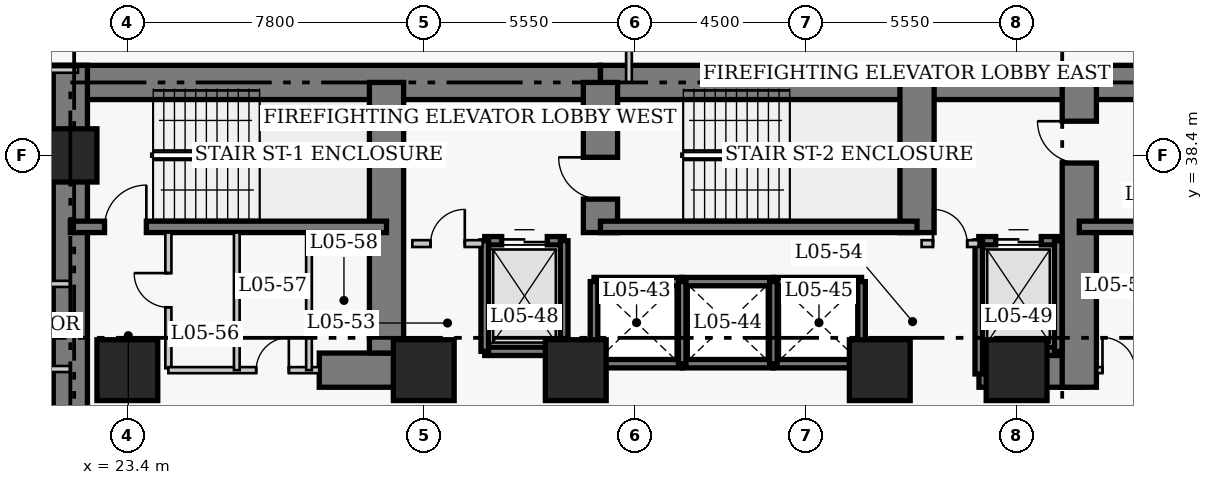
"""IFC4 building model, lengths in metres.
Left out: names, types, materials, properties, quantities, classifications, styles, units other than length and angle.
Written with IfcOpenShell. Run it as: python <this file> out.ifc"""

import sys

from ifc_helpers import new_model, si_unit, direction, frame, frame_2d, origin, origin_2d, place, context, subcontext, project, spatial, rectangle, extrude, element, fill, save


model = new_model("IFC4")
c1 = context("Model", 3, precision=1e-05, world=origin(), true_north=direction((0.0, 1.0)))
c2 = subcontext(c1, "Body", "Model", "MODEL_VIEW")
j1 = project(units=[si_unit("LENGTHUNIT", "METRE"), si_unit("PLANEANGLEUNIT", "RADIAN")], contexts=[c1])
p1 = place(None, origin())
s1 = spatial("IfcSite", under=j1, at=p1, CompositionType="ELEMENT")
p2 = place(p1, origin())
s2 = spatial("IfcBuilding", under=s1, at=p2, CompositionType="ELEMENT")
p3 = place(p2, frame((0.0, 0.0, 26.0)))
s3 = spatial("IfcBuildingStorey", under=s2, at=p3, CompositionType="ELEMENT", Elevation=26.0)
p4 = place(p3, frame((21.45, 40.32, 0.0), z_axis=(0.0, 0.0, 1.0), x_axis=(1.0, 0.0, 0.0)))
e1 = element("IfcWall", 1, at=p4, inside=s3, PredefinedType="SHEAR", context=c2, shape_type="SweptSolid", body=[
    extrude(rectangle(XDim=14.4, YDim=0.9, at=frame_2d((7.2, 0.0))), origin(), (0.0, 0.0, 1.0), 3.8),
])
p5 = place(p3, frame((35.85, 40.32, 0.0), z_axis=(0.0, 0.0, 1.0), x_axis=(1.0, 0.0, 0.0)))
e2 = element("IfcWall", 2, at=p5, inside=s3, PredefinedType="SHEAR", context=c2, shape_type="SweptSolid", body=[
    extrude(rectangle(XDim=12.6, YDim=0.9, at=frame_2d((6.3, 0.0))), origin(), (0.0, 0.0, 1.0), 3.8),
])
p6 = place(p3, frame((48.45, 40.32, 0.0), z_axis=(0.0, 0.0, 1.0), x_axis=(1.0, 0.0, 0.0)))
e3 = element("IfcWall", 3, at=p6, inside=s3, PredefinedType="SHEAR", context=c2, shape_type="SweptSolid", body=[
    extrude(rectangle(XDim=8.97, YDim=0.9, at=frame_2d((4.485, 0.0))), origin(), (0.0, 0.0, 1.0), 3.8),
])
p7 = place(p3, frame((21.9, 27.05, 0.0), z_axis=(0.0, 0.0, 1.0), x_axis=(0.0, 1.0, 0.0)))
e4 = element("IfcWall", 4, at=p7, inside=s3, PredefinedType="SHEAR", context=c2, shape_type="SweptSolid", body=[
    extrude(rectangle(XDim=13.72, YDim=0.9, at=frame_2d((6.86, 0.0))), origin(), (0.0, 0.0, 1.0), 3.8),
])
p8 = place(p3, frame((28.45, 32.75, 0.0), z_axis=(0.0, 0.0, 1.0), x_axis=(1.0, 0.0, 0.0)))
e5 = element("IfcWall", 5, at=p8, inside=s3, PredefinedType="SHEAR", context=c2, shape_type="SweptSolid", body=[
    extrude(rectangle(XDim=2.4, YDim=0.9, at=frame_2d((1.2, 0.0))), origin(), (0.0, 0.0, 1.0), 3.8),
])
p9 = place(p3, frame((45.81, 32.75, 0.0), z_axis=(0.0, 0.0, 1.0), x_axis=(1.0, 0.0, 0.0)))
e6 = element("IfcWall", 6, at=p9, inside=s3, PredefinedType="SHEAR", context=c2, shape_type="SweptSolid", body=[
    extrude(rectangle(XDim=2.64, YDim=0.9, at=frame_2d((1.32, 0.0))), origin(), (0.0, 0.0, 1.0), 3.8),
])
p10 = place(p3, frame((30.22, 33.2, 0.0), z_axis=(0.0, 0.0, 1.0), x_axis=(0.0, 1.0, 0.0)))
e7 = element("IfcWall", 7, at=p10, inside=s3, PredefinedType="SHEAR", context=c2, shape_type="SweptSolid", body=[
    extrude(rectangle(XDim=7.12, YDim=0.9, at=frame_2d((3.56, 0.0))), origin(), (0.0, 0.0, 1.0), 3.8),
])
p11 = place(p3, frame((35.85, 36.37, 0.0), z_axis=(0.0, 0.0, 1.0), x_axis=(0.0, 1.0, 0.0)))
e8 = element("IfcWall", 8, at=p11, inside=s3, PredefinedType="SHEAR", context=c2, shape_type="SweptSolid", body=[
    extrude(rectangle(XDim=3.95, YDim=0.9, at=frame_2d((1.975, 0.0))), origin(), (0.0, 0.0, 1.0), 3.8),
])
p12 = place(p11, frame((0.88, 0.0, 0.0)))
e9 = element("IfcOpeningElement", 9, at=p12, cuts=e8, PredefinedType="OPENING", context=c2, shape_type="SweptSolid", body=[
    extrude(rectangle(XDim=1.1, YDim=2.15, at=frame_2d((0.55, 1.075))), frame((0.0, 0.46, 0.0), z_axis=(0.0, -1.0, 0.0), x_axis=(1.0, 0.0, 0.0)), (0.0, 0.0, 1.0), 0.92),
])
p13 = place(p3, frame((44.18, 36.37, 0.0), z_axis=(0.0, 0.0, 1.0), x_axis=(0.0, 1.0, 0.0)))
e10 = element("IfcWall", 10, at=p13, inside=s3, PredefinedType="SHEAR", context=c2, shape_type="SweptSolid", body=[
    extrude(rectangle(XDim=3.95, YDim=0.9, at=frame_2d((1.975, 0.0))), origin(), (0.0, 0.0, 1.0), 3.8),
])
p14 = place(p3, frame((48.45, 32.3, 0.0), z_axis=(0.0, 0.0, 1.0), x_axis=(0.0, 1.0, 0.0)))
e11 = element("IfcWall", 11, at=p14, inside=s3, PredefinedType="SHEAR", context=c2, shape_type="SweptSolid", body=[
    extrude(rectangle(XDim=8.02, YDim=0.9, at=frame_2d((4.01, 0.0))), origin(), (0.0, 0.0, 1.0), 3.8),
])
p15 = place(p14, frame((5.9, 0.0, 0.0)))
e12 = element("IfcOpeningElement", 12, at=p15, cuts=e11, PredefinedType="OPENING", context=c2, shape_type="SweptSolid", body=[
    extrude(rectangle(XDim=1.1, YDim=2.15, at=frame_2d((0.55, 1.075))), frame((0.0, 0.46, 0.0), z_axis=(0.0, -1.0, 0.0), x_axis=(1.0, 0.0, 0.0)), (0.0, 0.0, 1.0), 0.92),
])
p16 = place(p3, frame((21.9, 36.52, 0.0), z_axis=(0.0, 0.0, 1.0), x_axis=(1.0, 0.0, 0.0)))
e13 = element("IfcWall", 13, at=p16, inside=s3, PredefinedType="SHEAR", context=c2, shape_type="SweptSolid", body=[
    extrude(rectangle(XDim=8.32, YDim=0.3, at=frame_2d((4.16, 0.0))), origin(), (0.0, 0.0, 1.0), 3.8),
])
p17 = place(p16, frame((0.9, 0.0, 0.0)))
e14 = element("IfcOpeningElement", 14, at=p17, cuts=e13, PredefinedType="OPENING", context=c2, shape_type="SweptSolid", body=[
    extrude(rectangle(XDim=1.1, YDim=2.15, at=frame_2d((0.55, 1.075))), frame((0.0, 0.16, 0.0), z_axis=(0.0, -1.0, 0.0), x_axis=(1.0, 0.0, 0.0)), (0.0, 0.0, 1.0), 0.32),
])
p18 = place(p3, frame((35.85, 36.52, 0.0), z_axis=(0.0, 0.0, 1.0), x_axis=(1.0, 0.0, 0.0)))
e15 = element("IfcWall", 15, at=p18, inside=s3, PredefinedType="SHEAR", context=c2, shape_type="SweptSolid", body=[
    extrude(rectangle(XDim=8.33, YDim=0.3, at=frame_2d((4.165, 0.0))), origin(), (0.0, 0.0, 1.0), 3.8),
])
p19 = place(p3, frame((48.45, 36.52, 0.0), z_axis=(0.0, 0.0, 1.0), x_axis=(1.0, 0.0, 0.0)))
e16 = element("IfcWall", 16, at=p19, inside=s3, PredefinedType="SHEAR", context=c2, shape_type="SweptSolid", body=[
    extrude(rectangle(XDim=8.52, YDim=0.3, at=frame_2d((4.26, 0.0))), origin(), (0.0, 0.0, 1.0), 3.8),
])
p20 = place(p3, frame((21.9, 38.4, 0.0), z_axis=(0.0, 0.0, 1.0), x_axis=(1.0, 0.0, 0.0)))
e17 = element("IfcColumn", 17, at=p20, inside=s3, PredefinedType="COLUMN", context=c2, shape_type="SweptSolid", body=[
    extrude(rectangle(XDim=1.4, YDim=1.4, at=origin_2d()), origin(), (0.0, 0.0, 1.0), 3.8),
])
for number, where, z_axis, x_axis in (
    (18, (23.4, 32.75, 0.0), (0.0, 0.0, 1.0), (1.0, 0.0, 0.0)),
    (19, (31.2, 32.75, 0.0), (0.0, 0.0, 1.0), (1.0, 0.0, 0.0)),
    (20, (35.2, 32.75, 0.0), (0.0, 0.0, 1.0), (1.0, 0.0, 0.0)),
    (21, (43.2, 32.75, 0.0), (0.0, 0.0, 1.0), (1.0, 0.0, 0.0)),
    (22, (46.8, 32.75, 0.0), (0.0, 0.0, 1.0), (1.0, 0.0, 0.0)),
):
    element("IfcColumn", number, at=place(p3, frame(where, z_axis=z_axis, x_axis=x_axis)), inside=s3, PredefinedType="COLUMN", context=c2, shape_type="SweptSolid", body=[
        extrude(rectangle(XDim=1.6, YDim=1.6, at=origin_2d()), origin(), (0.0, 0.0, 1.0), 3.8),
    ])
for number, where, z_axis, x_axis in (
    (23, (35.68, 35.08, 0.0), (0.0, 0.0, 1.0), (1.0, 0.0, 0.0)),
    (24, (35.68, 32.92, 0.0), (0.0, 0.0, 1.0), (1.0, 0.0, 0.0)),
):
    element("IfcWall", number, at=place(p3, frame(where, z_axis=z_axis, x_axis=x_axis)), inside=s3, PredefinedType="SHEAR", context=c2, shape_type="SweptSolid", body=[
        extrude(rectangle(XDim=2.32, YDim=0.22, at=frame_2d((1.16, 0.0))), origin(), (0.0, 0.0, 1.0), 3.8),
    ])
p21 = place(p3, frame((35.68, 32.92, 0.0), z_axis=(0.0, 0.0, 1.0), x_axis=(0.0, 1.0, 0.0)))
e25 = element("IfcWall", 25, at=p21, inside=s3, PredefinedType="SHEAR", context=c2, shape_type="SweptSolid", body=[
    extrude(rectangle(XDim=2.16, YDim=0.2, at=frame_2d((1.08, 0.0))), origin(), (0.0, 0.0, 1.0), 3.8),
])
for number, where, z_axis, x_axis in (
    (26, (38.0, 35.08, 0.0), (0.0, 0.0, 1.0), (1.0, 0.0, 0.0)),
    (27, (38.0, 32.92, 0.0), (0.0, 0.0, 1.0), (1.0, 0.0, 0.0)),
):
    element("IfcWall", number, at=place(p3, frame(where, z_axis=z_axis, x_axis=x_axis)), inside=s3, PredefinedType="SHEAR", context=c2, shape_type="SweptSolid", body=[
        extrude(rectangle(XDim=2.4, YDim=0.22, at=frame_2d((1.2, 0.0))), origin(), (0.0, 0.0, 1.0), 3.8),
    ])
p22 = place(p3, frame((38.0, 32.92, 0.0), z_axis=(0.0, 0.0, 1.0), x_axis=(0.0, 1.0, 0.0)))
e28 = element("IfcWall", 28, at=p22, inside=s3, PredefinedType="SHEAR", context=c2, shape_type="SweptSolid", body=[
    extrude(rectangle(XDim=2.16, YDim=0.2, at=frame_2d((1.08, 0.0))), origin(), (0.0, 0.0, 1.0), 3.8),
])
for number, where, z_axis, x_axis in (
    (29, (40.4, 35.08, 0.0), (0.0, 0.0, 1.0), (1.0, 0.0, 0.0)),
    (30, (40.4, 32.92, 0.0), (0.0, 0.0, 1.0), (1.0, 0.0, 0.0)),
):
    element("IfcWall", number, at=place(p3, frame(where, z_axis=z_axis, x_axis=x_axis)), inside=s3, PredefinedType="SHEAR", context=c2, shape_type="SweptSolid", body=[
        extrude(rectangle(XDim=2.32, YDim=0.22, at=frame_2d((1.16, 0.0))), origin(), (0.0, 0.0, 1.0), 3.8),
    ])
for number, where, z_axis, x_axis in (
    (31, (40.4, 32.92, 0.0), (0.0, 0.0, 1.0), (0.0, 1.0, 0.0)),
    (32, (42.72, 32.92, 0.0), (0.0, 0.0, 1.0), (0.0, 1.0, 0.0)),
):
    element("IfcWall", number, at=place(p3, frame(where, z_axis=z_axis, x_axis=x_axis)), inside=s3, PredefinedType="SHEAR", context=c2, shape_type="SweptSolid", body=[
        extrude(rectangle(XDim=2.16, YDim=0.2, at=frame_2d((1.08, 0.0))), origin(), (0.0, 0.0, 1.0), 3.8),
    ])
p23 = place(p3, frame((32.805, 36.155, 0.0), z_axis=(0.0, 0.0, 1.0), x_axis=(1.0, 0.0, 0.0)))
e33 = element("IfcWall", 33, at=p23, inside=s3, PredefinedType="SHEAR", context=c2, shape_type="SweptSolid", body=[
    extrude(rectangle(XDim=2.09, YDim=0.22, at=frame_2d((1.045, 0.0))), origin(), (0.0, 0.0, 1.0), 3.8),
])
p24 = place(p23, frame((0.445, 0.0, 0.0)))
e34 = element("IfcOpeningElement", 34, at=p24, cuts=e33, PredefinedType="OPENING", context=c2, shape_type="SweptSolid", body=[
    extrude(rectangle(XDim=1.2, YDim=2.15, at=frame_2d((0.6, 1.075))), frame((0.0, 0.12, 0.0), z_axis=(0.0, -1.0, 0.0), x_axis=(1.0, 0.0, 0.0)), (0.0, 0.0, 1.0), 0.24),
])
p25 = place(p3, frame((32.805, 33.245, 0.0), z_axis=(0.0, 0.0, 1.0), x_axis=(1.0, 0.0, 0.0)))
e35 = element("IfcWall", 35, at=p25, inside=s3, PredefinedType="SHEAR", context=c2, shape_type="SweptSolid", body=[
    extrude(rectangle(XDim=2.09, YDim=0.22, at=frame_2d((1.045, 0.0))), origin(), (0.0, 0.0, 1.0), 3.8),
])
for number, where, z_axis, x_axis in (
    (36, (32.805, 33.245, 0.0), (0.0, 0.0, 1.0), (0.0, 1.0, 0.0)),
    (37, (34.895, 33.245, 0.0), (0.0, 0.0, 1.0), (0.0, 1.0, 0.0)),
):
    element("IfcWall", number, at=place(p3, frame(where, z_axis=z_axis, x_axis=x_axis)), inside=s3, PredefinedType="SHEAR", context=c2, shape_type="SweptSolid", body=[
        extrude(rectangle(XDim=2.91, YDim=0.2, at=frame_2d((1.455, 0.0))), origin(), (0.0, 0.0, 1.0), 3.8),
    ])
p26 = place(p3, frame((45.805, 36.155, 0.0), z_axis=(0.0, 0.0, 1.0), x_axis=(1.0, 0.0, 0.0)))
e38 = element("IfcWall", 38, at=p26, inside=s3, PredefinedType="SHEAR", context=c2, shape_type="SweptSolid", body=[
    extrude(rectangle(XDim=2.09, YDim=0.22, at=frame_2d((1.045, 0.0))), origin(), (0.0, 0.0, 1.0), 3.8),
])
p27 = place(p26, frame((0.445, 0.0, 0.0)))
e39 = element("IfcOpeningElement", 39, at=p27, cuts=e38, PredefinedType="OPENING", context=c2, shape_type="SweptSolid", body=[
    extrude(rectangle(XDim=1.2, YDim=2.15, at=frame_2d((0.6, 1.075))), frame((0.0, 0.12, 0.0), z_axis=(0.0, -1.0, 0.0), x_axis=(1.0, 0.0, 0.0)), (0.0, 0.0, 1.0), 0.24),
])
p28 = place(p3, frame((45.805, 33.245, 0.0), z_axis=(0.0, 0.0, 1.0), x_axis=(1.0, 0.0, 0.0)))
e40 = element("IfcWall", 40, at=p28, inside=s3, PredefinedType="SHEAR", context=c2, shape_type="SweptSolid", body=[
    extrude(rectangle(XDim=2.09, YDim=0.22, at=frame_2d((1.045, 0.0))), origin(), (0.0, 0.0, 1.0), 3.8),
])
p29 = place(p3, frame((45.805, 32.65, 0.0), z_axis=(0.0, 0.0, 1.0), x_axis=(0.0, 1.0, 0.0)))
e41 = element("IfcWall", 41, at=p29, inside=s3, PredefinedType="SHEAR", context=c2, shape_type="SweptSolid", body=[
    extrude(rectangle(XDim=3.505, YDim=0.2, at=frame_2d((1.752, 0.0))), origin(), (0.0, 0.0, 1.0), 3.8),
])
p30 = place(p3, frame((47.895, 33.245, 0.0), z_axis=(0.0, 0.0, 1.0), x_axis=(0.0, 1.0, 0.0)))
e42 = element("IfcWall", 42, at=p30, inside=s3, PredefinedType="SHEAR", context=c2, shape_type="SweptSolid", body=[
    extrude(rectangle(XDim=2.91, YDim=0.2, at=frame_2d((1.455, 0.0))), origin(), (0.0, 0.0, 1.0), 3.8),
])
p31 = place(p3, frame((30.9, 36.08, 0.0), z_axis=(0.0, 0.0, 1.0), x_axis=(1.0, 0.0, 0.0)))
e43 = element("IfcWall", 43, at=p31, inside=s3, PredefinedType="PARTITIONING", context=c2, shape_type="SweptSolid", body=[
    extrude(rectangle(XDim=1.85, YDim=0.18, at=frame_2d((0.925, 0.0))), origin(), (0.0, 0.0, 1.0), 3.54),
])
p32 = place(p31, frame((0.48, 0.0, 0.0)))
e44 = element("IfcOpeningElement", 44, at=p32, cuts=e43, PredefinedType="OPENING", context=c2, shape_type="SweptSolid", body=[
    extrude(rectangle(XDim=0.9, YDim=2.15, at=frame_2d((0.45, 1.075))), frame((0.0, 0.1, 0.0), z_axis=(0.0, -1.0, 0.0), x_axis=(1.0, 0.0, 0.0)), (0.0, 0.0, 1.0), 0.2),
])
p33 = place(p3, frame((44.3, 36.08, 0.0), z_axis=(0.0, 0.0, 1.0), x_axis=(1.0, 0.0, 0.0)))
e45 = element("IfcWall", 45, at=p33, inside=s3, PredefinedType="PARTITIONING", context=c2, shape_type="SweptSolid", body=[
    extrude(rectangle(XDim=1.5, YDim=0.18, at=frame_2d((0.75, 0.0))), origin(), (0.0, 0.0, 1.0), 3.54),
])
p34 = place(p33, frame((0.3, 0.0, 0.0)))
e46 = element("IfcOpeningElement", 46, at=p34, cuts=e45, PredefinedType="OPENING", context=c2, shape_type="SweptSolid", body=[
    extrude(rectangle(XDim=0.9, YDim=2.15, at=frame_2d((0.45, 1.075))), frame((0.0, 0.1, 0.0), z_axis=(0.0, -1.0, 0.0), x_axis=(1.0, 0.0, 0.0)), (0.0, 0.0, 1.0), 0.2),
])
p35 = place(p3, frame((24.48, 32.8, 0.0), z_axis=(0.0, 0.0, 1.0), x_axis=(0.0, 1.0, 0.0)))
e47 = element("IfcWall", 47, at=p35, inside=s3, PredefinedType="PARTITIONING", context=c2, shape_type="SweptSolid", body=[
    extrude(rectangle(XDim=3.57, YDim=0.16, at=frame_2d((1.785, 0.0))), origin(), (0.0, 0.0, 1.0), 3.54),
])
p36 = place(p35, frame((1.604, 0.0, 0.0)))
e48 = element("IfcOpeningElement", 48, at=p36, cuts=e47, PredefinedType="OPENING", context=c2, shape_type="SweptSolid", body=[
    extrude(rectangle(XDim=0.9, YDim=2.1, at=frame_2d((0.45, 1.05))), frame((0.0, 0.09, 0.0), z_axis=(0.0, -1.0, 0.0), x_axis=(1.0, 0.0, 0.0)), (0.0, 0.0, 1.0), 0.18),
])
p37 = place(p3, frame((24.48, 32.75, 0.0), z_axis=(0.0, 0.0, 1.0), x_axis=(1.0, 0.0, 0.0)))
e49 = element("IfcWall", 49, at=p37, inside=s3, PredefinedType="PARTITIONING", context=c2, shape_type="SweptSolid", body=[
    extrude(rectangle(XDim=3.97, YDim=0.16, at=frame_2d((1.985, 0.0))), origin(), (0.0, 0.0, 1.0), 3.54),
])
p38 = place(p37, frame((2.31, 0.0, 0.0)))
e50 = element("IfcOpeningElement", 50, at=p38, cuts=e49, PredefinedType="OPENING", context=c2, shape_type="SweptSolid", body=[
    extrude(rectangle(XDim=0.86, YDim=2.05, at=frame_2d((0.43, 1.025))), frame((0.0, 0.09, 0.0), z_axis=(0.0, -1.0, 0.0), x_axis=(1.0, 0.0, 0.0)), (0.0, 0.0, 1.0), 0.18),
])
p39 = place(p3, frame((48.92, 32.75, 0.0), z_axis=(0.0, 0.0, 1.0), x_axis=(1.0, 0.0, 0.0)))
e51 = element("IfcWall", 51, at=p39, inside=s3, PredefinedType="PARTITIONING", context=c2, shape_type="SweptSolid", body=[
    extrude(rectangle(XDim=2.2, YDim=0.16, at=frame_2d((1.1, 0.0))), origin(), (0.0, 0.0, 1.0), 3.54),
])
p40 = place(p39, frame((0.14, 0.0, 0.0)))
e52 = element("IfcOpeningElement", 52, at=p40, cuts=e51, PredefinedType="OPENING", context=c2, shape_type="SweptSolid", body=[
    extrude(rectangle(XDim=0.86, YDim=2.05, at=frame_2d((0.43, 1.025))), frame((0.0, 0.09, 0.0), z_axis=(0.0, -1.0, 0.0), x_axis=(1.0, 0.0, 0.0)), (0.0, 0.0, 1.0), 0.18),
])
p41 = place(p39, frame((1.2, 0.0, 0.0)))
e53 = element("IfcOpeningElement", 53, at=p41, cuts=e51, PredefinedType="OPENING", context=c2, shape_type="SweptSolid", body=[
    extrude(rectangle(XDim=0.86, YDim=2.05, at=frame_2d((0.43, 1.025))), frame((0.0, 0.09, 0.0), z_axis=(0.0, -1.0, 0.0), x_axis=(1.0, 0.0, 0.0)), (0.0, 0.0, 1.0), 0.18),
])
for number, where, z_axis, x_axis in (
    (54, (26.28, 32.75, 0.0), (0.0, 0.0, 1.0), (0.0, 1.0, 0.0)),
    (55, (28.18, 32.75, 0.0), (0.0, 0.0, 1.0), (0.0, 1.0, 0.0)),
):
    element("IfcWall", number, at=place(p3, frame(where, z_axis=z_axis, x_axis=x_axis)), inside=s3, PredefinedType="PARTITIONING", context=c2, shape_type="SweptSolid", body=[
        extrude(rectangle(XDim=3.62, YDim=0.15, at=frame_2d((1.81, 0.0))), origin(), (0.0, 0.0, 1.0), 3.54),
    ])
for number, where, z_axis, x_axis in (
    (56, (18.86, 35.02, 0.0), (0.0, 0.0, 1.0), (1.0, 0.0, 0.0)),
    (57, (18.86, 32.78, 0.0), (0.0, 0.0, 1.0), (1.0, 0.0, 0.0)),
):
    element("IfcWall", number, at=place(p3, frame(where, z_axis=z_axis, x_axis=x_axis)), inside=s3, PredefinedType="PARTITIONING", context=c2, shape_type="SweptSolid", body=[
        extrude(rectangle(XDim=3.04, YDim=0.16, at=frame_2d((1.52, 0.0))), origin(), (0.0, 0.0, 1.0), 3.54),
    ])
p42 = place(p3, frame((16.64, 40.65, 0.0), z_axis=(0.0, 0.0, 1.0), x_axis=(1.0, 0.0, 0.0)))
e58 = element("IfcWall", 58, at=p42, inside=s3, PredefinedType="PARTITIONING", context=c2, shape_type="SweptSolid", body=[
    extrude(rectangle(XDim=5.46, YDim=0.15, at=frame_2d((2.73, 0.0))), origin(), (0.0, 0.0, 1.0), 3.54),
])
p43 = place(p42, frame((0.55, 0.0, 0.0)))
e59 = element("IfcOpeningElement", 59, at=p43, cuts=e58, PredefinedType="OPENING", context=c2, shape_type="SweptSolid", body=[
    extrude(rectangle(XDim=1.0, YDim=2.15, at=frame_2d((0.5, 1.075))), frame((0.0, 0.085, 0.0), z_axis=(0.0, -1.0, 0.0), x_axis=(1.0, 0.0, 0.0)), (0.0, 0.0, 1.0), 0.17),
])
p44 = place(p3, frame((36.6, 40.32, 0.0), z_axis=(0.0, 0.0, 1.0), x_axis=(0.0, 1.0, 0.0)))
e60 = element("IfcWall", 60, at=p44, inside=s3, PredefinedType="PARTITIONING", context=c2, shape_type="SweptSolid", body=[
    extrude(rectangle(XDim=5.045, YDim=0.15, at=frame_2d((2.522, 0.0))), origin(), (0.0, 0.0, 1.0), 3.54),
])
p45 = place(p24, origin())
e61 = element("IfcDoor", 61, at=p45, inside=s3, OperationType="DOUBLE_DOOR_SLIDING", PredefinedType="DOOR", context=c2, shape_type="SweptSolid", body=[
    extrude(rectangle(XDim=1.2, YDim=2.15, at=frame_2d((0.6, 1.075))), frame((0.0, 0.025, 0.0), z_axis=(0.0, -1.0, 0.0), x_axis=(1.0, 0.0, 0.0)), (0.0, 0.0, 1.0), 0.05),
])
fill(e34, e61)
p46 = place(p27, origin())
e62 = element("IfcDoor", 62, at=p46, inside=s3, OperationType="DOUBLE_DOOR_SLIDING", PredefinedType="DOOR", context=c2, shape_type="SweptSolid", body=[
    extrude(rectangle(XDim=1.2, YDim=2.15, at=frame_2d((0.6, 1.075))), frame((0.0, 0.025, 0.0), z_axis=(0.0, -1.0, 0.0), x_axis=(1.0, 0.0, 0.0)), (0.0, 0.0, 1.0), 0.05),
])
fill(e39, e62)
p47 = place(p32, origin())
e63 = element("IfcDoor", 63, at=p47, inside=s3, OperationType="SINGLE_SWING_RIGHT", PredefinedType="DOOR", context=c2, shape_type="SweptSolid", body=[
    extrude(rectangle(XDim=0.9, YDim=2.15, at=frame_2d((0.45, 1.075))), frame((0.0, 0.025, 0.0), z_axis=(0.0, -1.0, 0.0), x_axis=(1.0, 0.0, 0.0)), (0.0, 0.0, 1.0), 0.05),
])
fill(e44, e63)
p48 = place(p34, origin())
e64 = element("IfcDoor", 64, at=p48, inside=s3, OperationType="SINGLE_SWING_LEFT", PredefinedType="DOOR", context=c2, shape_type="SweptSolid", body=[
    extrude(rectangle(XDim=0.9, YDim=2.15, at=frame_2d((0.45, 1.075))), frame((0.0, 0.025, 0.0), z_axis=(0.0, -1.0, 0.0), x_axis=(1.0, 0.0, 0.0)), (0.0, 0.0, 1.0), 0.05),
])
fill(e46, e64)
p49 = place(p36, origin())
e65 = element("IfcDoor", 65, at=p49, inside=s3, OperationType="SINGLE_SWING_RIGHT", PredefinedType="DOOR", context=c2, shape_type="SweptSolid", body=[
    extrude(rectangle(XDim=0.9, YDim=2.1, at=frame_2d((0.45, 1.05))), frame((0.0, 0.025, 0.0), z_axis=(0.0, -1.0, 0.0), x_axis=(1.0, 0.0, 0.0)), (0.0, 0.0, 1.0), 0.05),
])
fill(e48, e65)
p50 = place(p38, origin())
e66 = element("IfcDoor", 66, at=p50, inside=s3, OperationType="SINGLE_SWING_RIGHT", PredefinedType="DOOR", context=c2, shape_type="SweptSolid", body=[
    extrude(rectangle(XDim=0.86, YDim=2.05, at=frame_2d((0.43, 1.025))), frame((0.0, 0.025, 0.0), z_axis=(0.0, -1.0, 0.0), x_axis=(1.0, 0.0, 0.0)), (0.0, 0.0, 1.0), 0.05),
])
fill(e50, e66)
p51 = place(p40, origin())
e67 = element("IfcDoor", 67, at=p51, inside=s3, OperationType="SINGLE_SWING_LEFT", PredefinedType="DOOR", context=c2, shape_type="SweptSolid", body=[
    extrude(rectangle(XDim=0.86, YDim=2.05, at=frame_2d((0.43, 1.025))), frame((0.0, 0.025, 0.0), z_axis=(0.0, -1.0, 0.0), x_axis=(1.0, 0.0, 0.0)), (0.0, 0.0, 1.0), 0.05),
])
fill(e52, e67)
p52 = place(p17, origin())
e68 = element("IfcDoor", 68, at=p52, inside=s3, OperationType="SINGLE_SWING_RIGHT", PredefinedType="DOOR", context=c2, shape_type="SweptSolid", body=[
    extrude(rectangle(XDim=1.1, YDim=2.15, at=frame_2d((0.55, 1.075))), frame((0.0, 0.025, 0.0), z_axis=(0.0, -1.0, 0.0), x_axis=(1.0, 0.0, 0.0)), (0.0, 0.0, 1.0), 0.05),
])
fill(e14, e68)
p53 = place(p12, origin())
e69 = element("IfcDoor", 69, at=p53, inside=s3, OperationType="SINGLE_SWING_RIGHT", PredefinedType="DOOR", context=c2, shape_type="SweptSolid", body=[
    extrude(rectangle(XDim=1.1, YDim=2.15, at=frame_2d((0.55, 1.075))), frame((0.0, 0.025, 0.0), z_axis=(0.0, -1.0, 0.0), x_axis=(1.0, 0.0, 0.0)), (0.0, 0.0, 1.0), 0.05),
])
fill(e9, e69)
p54 = place(p15, origin())
e70 = element("IfcDoor", 70, at=p54, inside=s3, OperationType="SINGLE_SWING_RIGHT", PredefinedType="DOOR", context=c2, shape_type="SweptSolid", body=[
    extrude(rectangle(XDim=1.1, YDim=2.15, at=frame_2d((0.55, 1.075))), frame((0.0, 0.025, 0.0), z_axis=(0.0, -1.0, 0.0), x_axis=(1.0, 0.0, 0.0)), (0.0, 0.0, 1.0), 0.05),
])
fill(e12, e70)
save(model, sys.argv[1])
